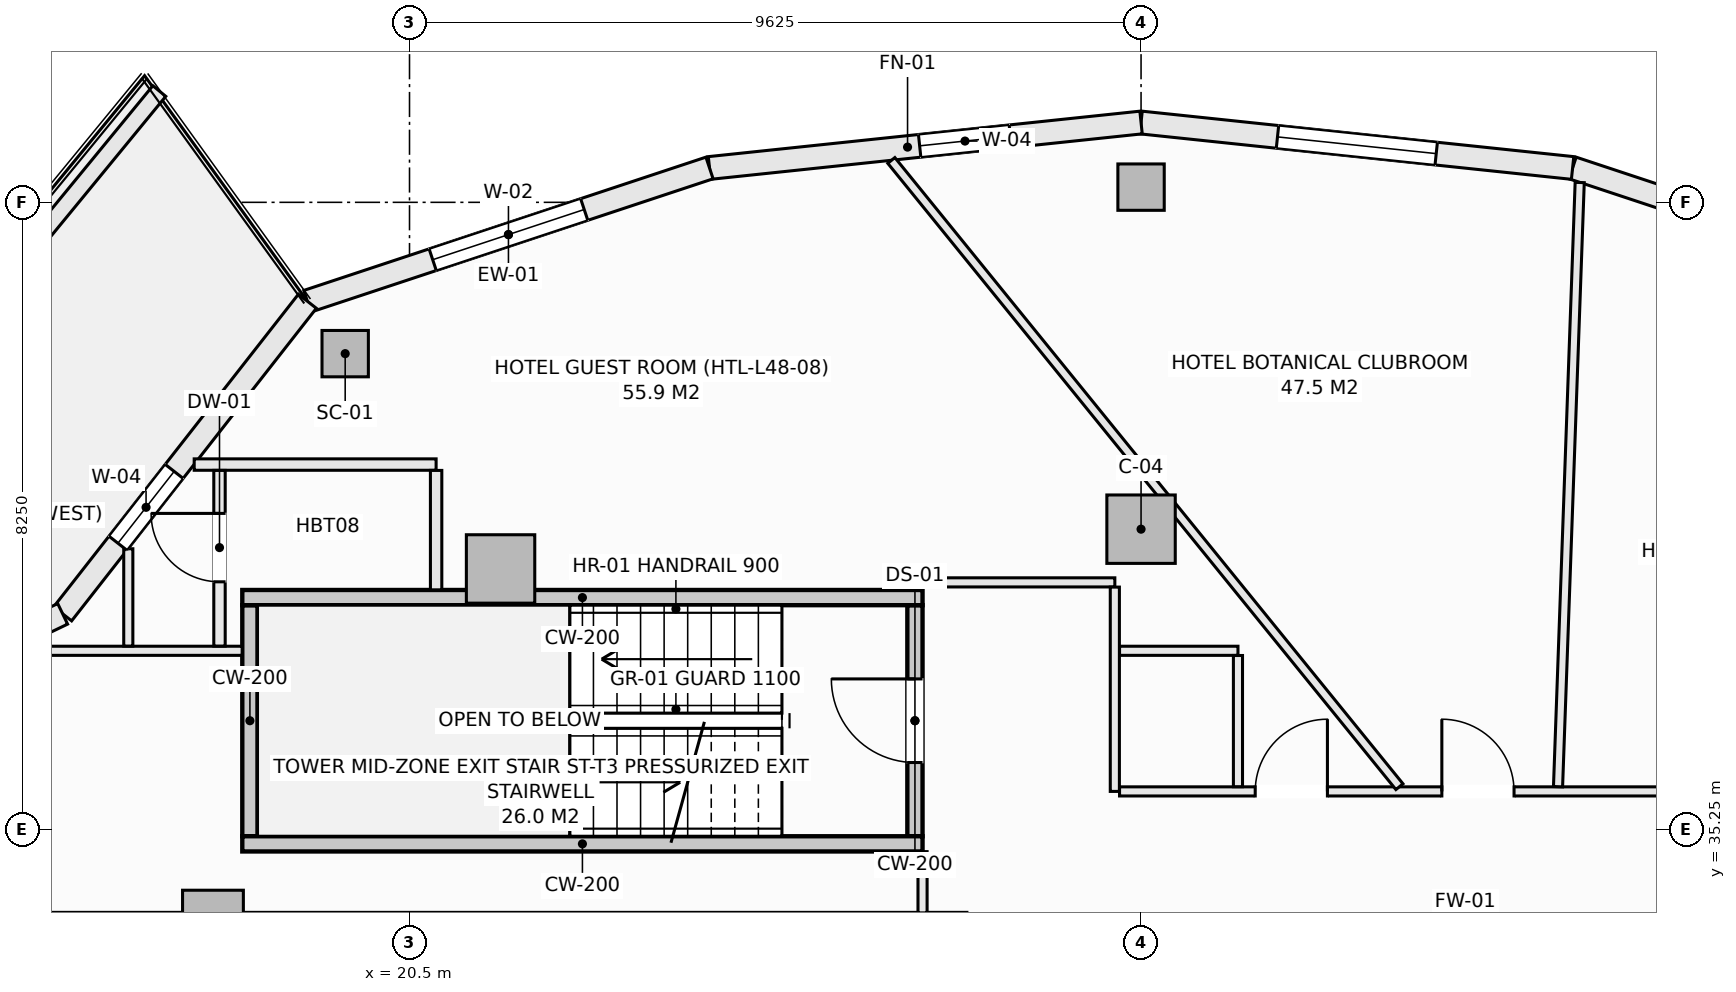
"""IFC4 building model, lengths in metres.
Left out: names, types, materials, properties, quantities, classifications, styles, units other than length and angle.
Written with IfcOpenShell. Run it as: python <this file> out.ifc"""

import sys

from ifc_helpers import new_model, si_unit, direction, frame, frame_2d, origin, origin_2d, place, context, subcontext, project, spatial, rectangle, hollow_rectangle, extrude, element, fill, save


model = new_model("IFC4")
c1 = context("Model", 3, precision=1e-05, world=origin(), true_north=direction((0.0, 1.0)))
c2 = subcontext(c1, "Body", "Model", "MODEL_VIEW")
j1 = project(units=[si_unit("LENGTHUNIT", "METRE"), si_unit("PLANEANGLEUNIT", "RADIAN")], contexts=[c1])
p1 = place(None, origin())
s1 = spatial("IfcSite", under=j1, at=p1, CompositionType="ELEMENT")
p2 = place(p1, origin())
s2 = spatial("IfcBuilding", under=s1, at=p2, CompositionType="ELEMENT")
p3 = place(p2, frame((0.0, 0.0, 183.5)))
s3 = spatial("IfcBuildingStorey", under=s2, at=p3, CompositionType="ELEMENT", Elevation=183.5)
for number, where, z_axis, x_axis in (
    (1, (30.125, 43.7, -0.27), (0.0, 0.0, 1.0), (1.0, 0.0, 0.0)),
    (2, (19.654, 41.51, -0.27), (0.0, 0.0, 1.0), (1.0, 0.0, 0.0)),
):
    element("IfcColumn", number, at=place(p3, frame(where, z_axis=z_axis, x_axis=x_axis)), inside=s3, PredefinedType="COLUMN", context=c2, shape_type="SweptSolid", body=[
        extrude(hollow_rectangle(XDim=0.61, YDim=0.61, WallThickness=0.025, at=origin_2d()), origin(), (0.0, 0.0, 1.0), 3.35),
    ])
for number, where, z_axis, x_axis in (
    (3, (30.125, 39.2, -0.27), (0.0, 0.0, 1.0), (1.0, 0.0, 0.0)),
    (4, (21.698, 38.677, -0.27), (0.0, 0.0, 1.0), (1.0, 0.0, 0.0)),
):
    element("IfcColumn", number, at=place(p3, frame(where, z_axis=z_axis, x_axis=x_axis)), inside=s3, PredefinedType="COLUMN", context=c2, shape_type="SweptSolid", body=[
        extrude(rectangle(XDim=0.9, YDim=0.9, at=origin_2d()), origin(), (0.0, 0.0, 1.0), 3.35),
    ])
p4 = place(p3, frame((17.914, 34.05, -0.27), z_axis=(0.0, 0.0, 1.0), x_axis=(1.0, 0.0, 0.0)))
e5 = element("IfcColumn", 5, at=p4, inside=s3, PredefinedType="PILASTER", context=c2, shape_type="SweptSolid", body=[
    extrude(rectangle(XDim=0.8, YDim=0.8, at=origin_2d()), origin(), (0.0, 0.0, 1.0), 3.35),
])
p5 = place(p3, frame((35.803, 43.952, 0.0), z_axis=(0.0, 0.0, 1.0), x_axis=(0.949246811547, -0.314532177636, 0.0)))
e6 = element("IfcWall", 6, at=p5, inside=s3, PredefinedType="SOLIDWALL", context=c2, shape_type="SweptSolid", body=[
    extrude(rectangle(XDim=5.574, YDim=0.3, at=frame_2d((2.787, 0.0))), origin(), (0.0, 0.0, 1.0), 2.603),
])
p6 = place(p5, frame((1.737, 0.0, 0.74)))
e7 = element("IfcOpeningElement", 7, at=p6, cuts=e6, PredefinedType="OPENING", context=c2, shape_type="SweptSolid", body=[
    extrude(rectangle(XDim=2.1, YDim=1.7, at=frame_2d((1.05, 0.85))), frame((0.0, 0.16, 0.0), z_axis=(0.0, -1.0, 0.0), x_axis=(1.0, 0.0, 0.0)), (0.0, 0.0, 1.0), 0.32),
])
p7 = place(p3, frame((30.125, 44.55, 0.0), z_axis=(0.0, 0.0, 1.0), x_axis=(0.994496545245, -0.104769372887, 0.0)))
e8 = element("IfcWall", 8, at=p7, inside=s3, PredefinedType="SOLIDWALL", context=c2, shape_type="SweptSolid", body=[
    extrude(rectangle(XDim=5.709, YDim=0.3, at=frame_2d((2.854, 0.0))), origin(), (0.0, 0.0, 1.0), 2.603),
])
p8 = place(p7, frame((1.805, 0.0, 0.74)))
e9 = element("IfcOpeningElement", 9, at=p8, cuts=e8, PredefinedType="OPENING", context=c2, shape_type="SweptSolid", body=[
    extrude(rectangle(XDim=2.1, YDim=1.7, at=frame_2d((1.05, 0.85))), frame((0.0, 0.16, 0.0), z_axis=(0.0, -1.0, 0.0), x_axis=(1.0, 0.0, 0.0)), (0.0, 0.0, 1.0), 0.32),
])
p9 = place(p3, frame((24.447, 43.952, 0.0), z_axis=(0.0, 0.0, 1.0), x_axis=(0.994496545245, 0.104769372887, 0.0)))
e10 = element("IfcWall", 10, at=p9, inside=s3, PredefinedType="SOLIDWALL", context=c2, shape_type="SweptSolid", body=[
    extrude(rectangle(XDim=5.709, YDim=0.3, at=frame_2d((2.854, 0.0))), origin(), (0.0, 0.0, 1.0), 2.603),
])
p10 = place(p9, frame((2.78, 0.0, 0.72)))
e11 = element("IfcOpeningElement", 11, at=p10, cuts=e10, PredefinedType="OPENING", context=c2, shape_type="SweptSolid", body=[
    extrude(rectangle(XDim=1.2, YDim=1.65, at=frame_2d((0.6, 0.825))), frame((0.0, 0.16, 0.0), z_axis=(0.0, -1.0, 0.0), x_axis=(1.0, 0.0, 0.0)), (0.0, 0.0, 1.0), 0.32),
])
p11 = place(p3, frame((19.156, 42.199, 0.0), z_axis=(0.0, 0.0, 1.0), x_axis=(0.949246811547, 0.314532177636, 0.0)))
e12 = element("IfcWall", 12, at=p11, inside=s3, PredefinedType="SOLIDWALL", context=c2, shape_type="SweptSolid", body=[
    extrude(rectangle(XDim=5.574, YDim=0.3, at=frame_2d((2.787, 0.0))), origin(), (0.0, 0.0, 1.0), 2.603),
])
p12 = place(p11, frame((1.737, 0.0, 0.74)))
e13 = element("IfcOpeningElement", 13, at=p12, cuts=e12, PredefinedType="OPENING", context=c2, shape_type="SweptSolid", body=[
    extrude(rectangle(XDim=2.1, YDim=1.7, at=frame_2d((1.05, 0.85))), frame((0.0, 0.16, 0.0), z_axis=(0.0, -1.0, 0.0), x_axis=(1.0, 0.0, 0.0)), (0.0, 0.0, 1.0), 0.32),
])
p13 = place(p3, frame((15.937, 38.086, 0.0), z_axis=(0.0, 0.0, 1.0), x_axis=(0.616429245738, 0.787410302828, 0.0)))
e14 = element("IfcWall", 14, at=p13, inside=s3, PredefinedType="SOLIDWALL", context=c2, shape_type="SweptSolid", body=[
    extrude(rectangle(XDim=5.223, YDim=0.3, at=frame_2d((2.612, 0.0))), origin(), (0.0, 0.0, 1.0), 2.603),
])
p14 = place(p13, frame((1.18, 0.0, 0.72)))
e15 = element("IfcOpeningElement", 15, at=p14, cuts=e14, PredefinedType="OPENING", context=c2, shape_type="SweptSolid", body=[
    extrude(rectangle(XDim=1.2, YDim=1.65, at=frame_2d((0.6, 0.825))), frame((0.0, 0.16, 0.0), z_axis=(0.0, -1.0, 0.0), x_axis=(1.0, 0.0, 0.0)), (0.0, 0.0, 1.0), 0.32),
])
p15 = place(p3, frame((11.127, 35.775, 0.0), z_axis=(0.0, 0.0, 1.0), x_axis=(0.901353070301, 0.433085029363, 0.0)))
e16 = element("IfcWall", 16, at=p15, inside=s3, PredefinedType="SOLIDWALL", context=c2, shape_type="SweptSolid", body=[
    extrude(rectangle(XDim=5.336, YDim=0.3, at=frame_2d((2.668, 0.0))), origin(), (0.0, 0.0, 1.0), 2.603),
])
p16 = place(p15, frame((1.768, 0.0, 0.0)))
e17 = element("IfcOpeningElement", 17, at=p16, cuts=e16, PredefinedType="OPENING", context=c2, shape_type="SweptSolid", body=[
    extrude(rectangle(XDim=1.8, YDim=2.25, at=frame_2d((0.9, 1.125))), frame((0.0, 0.16, 0.0), z_axis=(0.0, -1.0, 0.0), x_axis=(1.0, 0.0, 0.0)), (0.0, 0.0, 1.0), 0.32),
])
p17 = place(p3, frame((13.246, 40.137, 0.0), z_axis=(0.0, 0.0, 1.0), x_axis=(0.634429234628, 0.77298094818, 0.0)))
e18 = element("IfcWall", 18, at=p17, inside=s3, PredefinedType="PARAPET", context=c2, shape_type="SweptSolid", body=[
    extrude(rectangle(XDim=6.245, YDim=0.22, at=frame_2d((3.123, 0.0))), origin(), (0.0, 0.0, 1.0), 0.52),
])
p18 = place(p3, frame((27.15, 35.16, -0.27), z_axis=(0.0, 0.0, 1.0), x_axis=(0.0, 1.0, 0.0)))
e19 = element("IfcWall", 19, at=p18, inside=s3, PredefinedType="SHEAR", context=c2, shape_type="SweptSolid", body=[
    extrude(rectangle(XDim=3.04, YDim=0.2, at=frame_2d((1.52, 0.0))), origin(), (0.0, 0.0, 1.0), 3.35),
])
p19 = place(p18, frame((0.97, 0.0, 0.27)))
e20 = element("IfcOpeningElement", 20, at=p19, cuts=e19, PredefinedType="OPENING", context=c2, shape_type="SweptSolid", body=[
    extrude(rectangle(XDim=1.1, YDim=2.15, at=frame_2d((0.55, 1.075))), frame((0.0, 0.11, 0.0), z_axis=(0.0, -1.0, 0.0), x_axis=(1.0, 0.0, 0.0)), (0.0, 0.0, 1.0), 0.22),
])
p20 = place(p3, frame((18.4, 35.16, -0.27), z_axis=(0.0, 0.0, 1.0), x_axis=(0.0, 1.0, 0.0)))
e21 = element("IfcWall", 21, at=p20, inside=s3, PredefinedType="SHEAR", context=c2, shape_type="SweptSolid", body=[
    extrude(rectangle(XDim=3.04, YDim=0.2, at=frame_2d((1.52, 0.0))), origin(), (0.0, 0.0, 1.0), 3.35),
])
for number, where, z_axis, x_axis in (
    (22, (18.3, 38.3, -0.27), (0.0, 0.0, 1.0), (1.0, 0.0, 0.0)),
    (23, (18.3, 35.06, -0.27), (0.0, 0.0, 1.0), (1.0, 0.0, 0.0)),
):
    element("IfcWall", number, at=place(p3, frame(where, z_axis=z_axis, x_axis=x_axis)), inside=s3, PredefinedType="SHEAR", context=c2, shape_type="SweptSolid", body=[
        extrude(rectangle(XDim=8.95, YDim=0.2, at=frame_2d((4.475, 0.0))), origin(), (0.0, 0.0, 1.0), 3.35),
    ])
p21 = place(p3, frame((27.25, 34.152, 0.0), z_axis=(0.0, 0.0, 1.0), x_axis=(0.0, 1.0, 0.0)))
e24 = element("IfcWall", 24, at=p21, inside=s3, PredefinedType="PARTITIONING", context=c2, shape_type="SweptSolid", body=[
    extrude(rectangle(XDim=0.806, YDim=0.12, at=frame_2d((0.403, 0.0))), origin(), (0.0, 0.0, 1.0), 3.08),
])
p22 = place(p3, frame((27.25, 38.5, 0.0), z_axis=(0.0, 0.0, 1.0), x_axis=(1.0, 0.0, 0.0)))
e25 = element("IfcWall", 25, at=p22, inside=s3, PredefinedType="PARTITIONING", context=c2, shape_type="SweptSolid", body=[
    extrude(rectangle(XDim=2.53, YDim=0.12, at=frame_2d((1.265, 0.0))), origin(), (0.0, 0.0, 1.0), 3.08),
])
p23 = place(p3, frame((29.78, 35.75, 0.0), z_axis=(0.0, 0.0, 1.0), x_axis=(0.0, 1.0, 0.0)))
e26 = element("IfcWall", 26, at=p23, inside=s3, PredefinedType="PARTITIONING", context=c2, shape_type="SweptSolid", body=[
    extrude(rectangle(XDim=2.688, YDim=0.12, at=frame_2d((1.344, 0.0))), origin(), (0.0, 0.0, 1.0), 3.08),
])
p24 = place(p3, frame((29.842, 35.75, 0.0), z_axis=(0.0, 0.0, 1.0), x_axis=(1.0, 0.0, 0.0)))
e27 = element("IfcWall", 27, at=p24, inside=s3, PredefinedType="PARTITIONING", context=c2, shape_type="SweptSolid", body=[
    extrude(rectangle(XDim=9.116, YDim=0.12, at=frame_2d((4.558, 0.0))), origin(), (0.0, 0.0, 1.0), 2.455),
])
p25 = place(p24, frame((4.24, 0.0, 0.0)))
e28 = element("IfcOpeningElement", 28, at=p25, cuts=e27, PredefinedType="OPENING", context=c2, shape_type="SweptSolid", body=[
    extrude(rectangle(XDim=0.95, YDim=2.1, at=frame_2d((0.475, 1.05))), frame((0.0, 0.07, 0.0), z_axis=(0.0, -1.0, 0.0), x_axis=(1.0, 0.0, 0.0)), (0.0, 0.0, 1.0), 0.14),
])
p26 = place(p24, frame((1.785, 0.0, 0.0)))
e29 = element("IfcOpeningElement", 29, at=p26, cuts=e27, PredefinedType="OPENING", context=c2, shape_type="SweptSolid", body=[
    extrude(rectangle(XDim=0.95, YDim=2.1, at=frame_2d((0.475, 1.05))), frame((0.0, 0.07, 0.0), z_axis=(0.0, -1.0, 0.0), x_axis=(1.0, 0.0, 0.0)), (0.0, 0.0, 1.0), 0.14),
])
p27 = place(p3, frame((15.276, 37.6, 0.0), z_axis=(0.0, 0.0, 1.0), x_axis=(1.0, 0.0, 0.0)))
e30 = element("IfcWall", 30, at=p27, inside=s3, PredefinedType="PARTITIONING", context=c2, shape_type="SweptSolid", body=[
    extrude(rectangle(XDim=3.022, YDim=0.12, at=frame_2d((1.511, 0.0))), origin(), (0.0, 0.0, 1.0), 3.08),
])
p28 = place(p3, frame((29.842, 37.6, 0.0), z_axis=(0.0, 0.0, 1.0), x_axis=(1.0, 0.0, 0.0)))
e31 = element("IfcWall", 31, at=p28, inside=s3, PredefinedType="PARTITIONING", context=c2, shape_type="SweptSolid", body=[
    extrude(rectangle(XDim=1.558, YDim=0.12, at=frame_2d((0.779, 0.0))), origin(), (0.0, 0.0, 1.0), 3.08),
])
p29 = place(p3, frame((31.4, 35.812, 0.0), z_axis=(0.0, 0.0, 1.0), x_axis=(0.0, 1.0, 0.0)))
e32 = element("IfcWall", 32, at=p29, inside=s3, PredefinedType="PARTITIONING", context=c2, shape_type="SweptSolid", body=[
    extrude(rectangle(XDim=1.726, YDim=0.12, at=frame_2d((0.863, 0.0))), origin(), (0.0, 0.0, 1.0), 3.08),
])
p30 = place(p3, frame((17.667, 40.05, 0.0), z_axis=(0.0, 0.0, 1.0), x_axis=(1.0, 0.0, 0.0)))
e33 = element("IfcWall", 33, at=p30, inside=s3, PredefinedType="PARTITIONING", context=c2, shape_type="SweptSolid", body=[
    extrude(rectangle(XDim=3.183, YDim=0.15, at=frame_2d((1.592, 0.0))), origin(), (0.0, 0.0, 1.0), 2.603),
])
p31 = place(p3, frame((35.611, 35.812, 0.0), z_axis=(0.0, 0.0, 1.0), x_axis=(0.035850277254, 0.999357172197, 0.0)))
e34 = element("IfcWall", 34, at=p31, inside=s3, PredefinedType="PARTITIONING", context=c2, shape_type="SweptSolid", body=[
    extrude(rectangle(XDim=7.954, YDim=0.12, at=frame_2d((3.977, 0.0))), origin(), (0.0, 0.0, 1.0), 3.08),
])
p32 = place(p3, frame((26.839, 44.051, 0.0), z_axis=(0.0, 0.0, 1.0), x_axis=(0.630087458982, -0.77652417479, 0.0)))
e35 = element("IfcWall", 35, at=p32, inside=s3, PredefinedType="PARTITIONING", context=c2, shape_type="SweptSolid", body=[
    extrude(rectangle(XDim=10.61, YDim=0.12, at=frame_2d((5.305, 0.0))), origin(), (0.0, 0.0, 1.0), 2.455),
])
p33 = place(p3, frame((20.85, 38.402, 0.0), z_axis=(0.0, 0.0, 1.0), x_axis=(0.0, 1.0, 0.0)))
e36 = element("IfcWall", 36, at=p33, inside=s3, PredefinedType="PARTITIONING", context=c2, shape_type="SweptSolid", body=[
    extrude(rectangle(XDim=1.571, YDim=0.15, at=frame_2d((0.785, 0.0))), origin(), (0.0, 0.0, 1.0), 2.455),
])
p34 = place(p3, frame((18.0, 37.662, 0.0), z_axis=(0.0, 0.0, 1.0), x_axis=(0.0, 1.0, 0.0)))
e37 = element("IfcWall", 37, at=p34, inside=s3, PredefinedType="PARTITIONING", context=c2, shape_type="SweptSolid", body=[
    extrude(rectangle(XDim=2.311, YDim=0.15, at=frame_2d((1.155, 0.0))), origin(), (0.0, 0.0, 1.0), 3.08),
])
p35 = place(p34, frame((0.845, 0.0, 0.0)))
e38 = element("IfcOpeningElement", 38, at=p35, cuts=e37, PredefinedType="OPENING", context=c2, shape_type="SweptSolid", body=[
    extrude(rectangle(XDim=0.9, YDim=2.1, at=frame_2d((0.45, 1.05))), frame((0.0, 0.085, 0.0), z_axis=(0.0, -1.0, 0.0), x_axis=(1.0, 0.0, 0.0)), (0.0, 0.0, 1.0), 0.17),
])
p36 = place(p3, frame((16.8, 37.662, 0.0), z_axis=(0.0, 0.0, 1.0), x_axis=(0.0, 1.0, 0.0)))
e39 = element("IfcWall", 39, at=p36, inside=s3, PredefinedType="PARTITIONING", context=c2, shape_type="SweptSolid", body=[
    extrude(rectangle(XDim=1.28, YDim=0.12, at=frame_2d((0.64, 0.0))), origin(), (0.0, 0.0, 1.0), 3.08),
])
p37 = place(p8, origin())
e40 = element("IfcWindow", 40, at=p37, inside=s3, PartitioningType="SINGLE_PANEL", PredefinedType="WINDOW", context=c2, shape_type="SweptSolid", body=[
    extrude(rectangle(XDim=2.1, YDim=1.7, at=frame_2d((1.05, 0.85))), frame((0.0, 0.03, 0.0), z_axis=(0.0, -1.0, 0.0), x_axis=(1.0, 0.0, 0.0)), (0.0, 0.0, 1.0), 0.06),
])
fill(e9, e40)
p38 = place(p10, origin())
e41 = element("IfcWindow", 41, at=p38, inside=s3, PartitioningType="SINGLE_PANEL", PredefinedType="WINDOW", context=c2, shape_type="SweptSolid", body=[
    extrude(rectangle(XDim=1.2, YDim=1.65, at=frame_2d((0.6, 0.825))), frame((0.0, 0.03, 0.0), z_axis=(0.0, -1.0, 0.0), x_axis=(1.0, 0.0, 0.0)), (0.0, 0.0, 1.0), 0.06),
])
fill(e11, e41)
p39 = place(p12, origin())
e42 = element("IfcWindow", 42, at=p39, inside=s3, PartitioningType="SINGLE_PANEL", PredefinedType="WINDOW", context=c2, shape_type="SweptSolid", body=[
    extrude(rectangle(XDim=2.1, YDim=1.7, at=frame_2d((1.05, 0.85))), frame((0.0, 0.03, 0.0), z_axis=(0.0, -1.0, 0.0), x_axis=(1.0, 0.0, 0.0)), (0.0, 0.0, 1.0), 0.06),
])
fill(e13, e42)
p40 = place(p14, origin())
e43 = element("IfcWindow", 43, at=p40, inside=s3, PartitioningType="SINGLE_PANEL", PredefinedType="WINDOW", context=c2, shape_type="SweptSolid", body=[
    extrude(rectangle(XDim=1.2, YDim=1.65, at=frame_2d((0.6, 0.825))), frame((0.0, 0.03, 0.0), z_axis=(0.0, -1.0, 0.0), x_axis=(1.0, 0.0, 0.0)), (0.0, 0.0, 1.0), 0.06),
])
fill(e15, e43)
p41 = place(p19, origin())
e44 = element("IfcDoor", 44, at=p41, inside=s3, OperationType="SINGLE_SWING_RIGHT", PredefinedType="DOOR", context=c2, shape_type="SweptSolid", body=[
    extrude(rectangle(XDim=1.1, YDim=2.15, at=frame_2d((0.55, 1.075))), frame((0.0, 0.025, 0.0), z_axis=(0.0, -1.0, 0.0), x_axis=(1.0, 0.0, 0.0)), (0.0, 0.0, 1.0), 0.05),
])
fill(e20, e44)
p42 = place(p25, origin())
e45 = element("IfcDoor", 45, at=p42, inside=s3, OperationType="SINGLE_SWING_LEFT", PredefinedType="DOOR", context=c2, shape_type="SweptSolid", body=[
    extrude(rectangle(XDim=0.95, YDim=2.1, at=frame_2d((0.475, 1.05))), frame((0.0, 0.025, 0.0), z_axis=(0.0, -1.0, 0.0), x_axis=(1.0, 0.0, 0.0)), (0.0, 0.0, 1.0), 0.05),
])
fill(e28, e45)
p43 = place(p26, origin())
e46 = element("IfcDoor", 46, at=p43, inside=s3, OperationType="SINGLE_SWING_RIGHT", PredefinedType="DOOR", context=c2, shape_type="SweptSolid", body=[
    extrude(rectangle(XDim=0.95, YDim=2.1, at=frame_2d((0.475, 1.05))), frame((0.0, 0.025, 0.0), z_axis=(0.0, -1.0, 0.0), x_axis=(1.0, 0.0, 0.0)), (0.0, 0.0, 1.0), 0.05),
])
fill(e29, e46)
p44 = place(p35, origin())
e47 = element("IfcDoor", 47, at=p44, inside=s3, OperationType="SINGLE_SWING_RIGHT", PredefinedType="DOOR", context=c2, shape_type="SweptSolid", body=[
    extrude(rectangle(XDim=0.9, YDim=2.1, at=frame_2d((0.45, 1.05))), frame((0.0, 0.025, 0.0), z_axis=(0.0, -1.0, 0.0), x_axis=(1.0, 0.0, 0.0)), (0.0, 0.0, 1.0), 0.05),
])
fill(e38, e47)
save(model, sys.argv[1])
